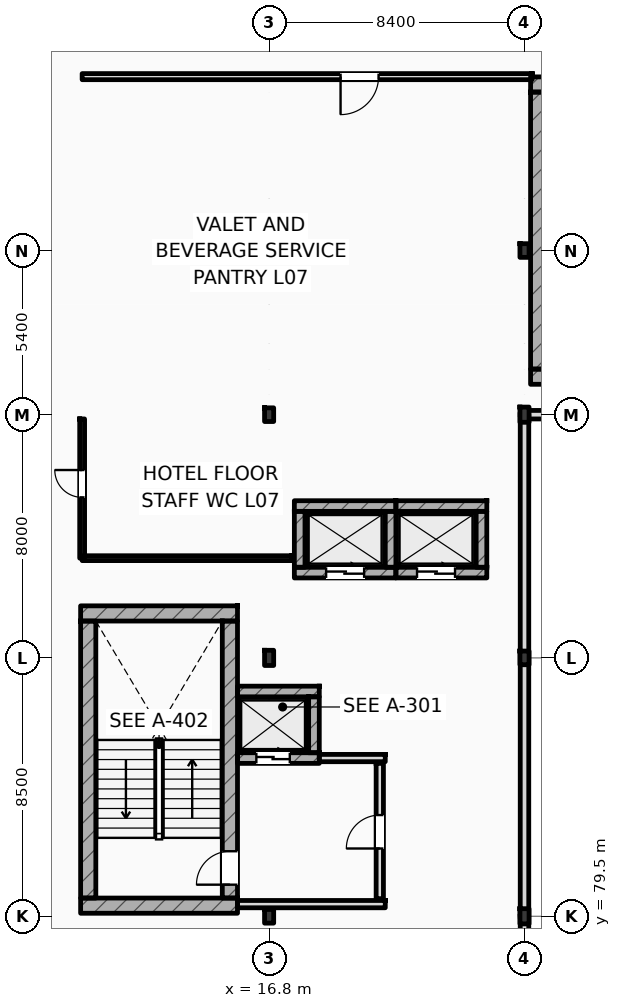
"""IFC4 building model, lengths in metres.
Left out: names, types, materials, properties, quantities, classifications, styles, units other than length and angle.
Written with IfcOpenShell. Run it as: python <this file> out.ifc"""

import sys

from ifc_helpers import new_model, si_unit, direction, frame, frame_2d, origin, origin_2d, place, context, subcontext, project, spatial, rectangle, i_section, extrude, element, fill, save


model = new_model("IFC4")
c1 = context("Model", 3, precision=1e-05, world=origin(), true_north=direction((0.0, 1.0)))
c2 = subcontext(c1, "Body", "Model", "MODEL_VIEW")
j1 = project(units=[si_unit("LENGTHUNIT", "METRE"), si_unit("PLANEANGLEUNIT", "RADIAN")], contexts=[c1])
p1 = place(None, origin())
s1 = spatial("IfcSite", under=j1, at=p1, CompositionType="ELEMENT")
p2 = place(p1, origin())
s2 = spatial("IfcBuilding", under=s1, at=p2, CompositionType="ELEMENT")
p3 = place(p2, frame((0.0, 0.0, 31.8)))
s3 = spatial("IfcBuildingStorey", under=s2, at=p3, CompositionType="ELEMENT", Elevation=31.8)
p4 = place(p3, frame((16.8, 79.5, 0.0), z_axis=(0.0, 0.0, 1.0), x_axis=(1.0, 0.0, 0.0)))
e1 = element("IfcColumn", 1, at=p4, inside=s3, PredefinedType="COLUMN", context=c2, shape_type="SweptSolid", body=[
    extrude(i_section(OverallWidth=0.3, OverallDepth=0.45, WebThickness=0.014, FlangeThickness=0.026, FilletRadius=0.027, at=origin_2d()), origin(), (0.0, 0.0, 1.0), 3.6),
])
p5 = place(p3, frame((16.8, 88.0, 0.0), z_axis=(0.0, 0.0, 1.0), x_axis=(1.0, 0.0, 0.0)))
e2 = element("IfcColumn", 2, at=p5, inside=s3, PredefinedType="COLUMN", context=c2, shape_type="SweptSolid", body=[
    extrude(i_section(OverallWidth=0.3, OverallDepth=0.5, WebThickness=0.014, FlangeThickness=0.028, FilletRadius=0.027, at=origin_2d()), origin(), (0.0, 0.0, 1.0), 3.6),
])
p6 = place(p3, frame((16.8, 96.0, 0.0), z_axis=(0.0, 0.0, 1.0), x_axis=(1.0, 0.0, 0.0)))
e3 = element("IfcColumn", 3, at=p6, inside=s3, PredefinedType="COLUMN", context=c2, shape_type="SweptSolid", body=[
    extrude(i_section(OverallWidth=0.3, OverallDepth=0.45, WebThickness=0.014, FlangeThickness=0.026, FilletRadius=0.027, at=origin_2d()), origin(), (0.0, 0.0, 1.0), 3.6),
])
p7 = place(p3, frame((25.2, 79.5, 0.0), z_axis=(0.0, 0.0, 1.0), x_axis=(1.0, 0.0, 0.0)))
e4 = element("IfcColumn", 4, at=p7, inside=s3, PredefinedType="COLUMN", context=c2, shape_type="SweptSolid", body=[
    extrude(i_section(OverallWidth=0.3, OverallDepth=0.5, WebThickness=0.014, FlangeThickness=0.028, FilletRadius=0.027, at=origin_2d()), origin(), (0.0, 0.0, 1.0), 3.6),
])
p8 = place(p3, frame((25.2, 88.0, 0.0), z_axis=(0.0, 0.0, 1.0), x_axis=(1.0, 0.0, 0.0)))
e5 = element("IfcColumn", 5, at=p8, inside=s3, PredefinedType="COLUMN", context=c2, shape_type="SweptSolid", body=[
    extrude(i_section(OverallWidth=0.3, OverallDepth=0.45, WebThickness=0.014, FlangeThickness=0.026, FilletRadius=0.027, at=origin_2d()), origin(), (0.0, 0.0, 1.0), 3.6),
])
p9 = place(p3, frame((25.2, 96.0, 0.0), z_axis=(0.0, 0.0, 1.0), x_axis=(1.0, 0.0, 0.0)))
e6 = element("IfcColumn", 6, at=p9, inside=s3, PredefinedType="COLUMN", context=c2, shape_type="SweptSolid", body=[
    extrude(i_section(OverallWidth=0.3, OverallDepth=0.5, WebThickness=0.014, FlangeThickness=0.028, FilletRadius=0.027, at=origin_2d()), origin(), (0.0, 0.0, 1.0), 3.6),
])
for number, where, z_axis, x_axis in (
    (7, (16.8, 101.4, 0.0), (0.0, 0.0, 1.0), (1.0, 0.0, 0.0)),
    (8, (25.2, 101.4, 0.0), (0.0, 0.0, 1.0), (1.0, 0.0, 0.0)),
):
    element("IfcColumn", number, at=place(p3, frame(where, z_axis=z_axis, x_axis=x_axis)), inside=s3, PredefinedType="COLUMN", context=c2, shape_type="SweptSolid", body=[
        extrude(i_section(OverallWidth=0.3, OverallDepth=0.45, WebThickness=0.014, FlangeThickness=0.026, FilletRadius=0.027, at=origin_2d()), origin(), (0.0, 0.0, 1.0), 3.6),
    ])
for number, where, z_axis, x_axis in (
    (9, (10.6, 89.462, 0.0), (0.0, 0.0, 1.0), (1.0, 0.0, 0.0)),
    (10, (10.6, 79.85, 0.0), (0.0, 0.0, 1.0), (1.0, 0.0, 0.0)),
):
    element("IfcWall", number, at=place(p3, frame(where, z_axis=z_axis, x_axis=x_axis)), inside=s3, PredefinedType="SHEAR", context=c2, shape_type="SweptSolid", body=[
        extrude(rectangle(XDim=5.16, YDim=0.5, at=frame_2d((2.58, 0.0))), origin(), (0.0, 0.0, 1.0), 3.6),
    ])
p10 = place(p3, frame((10.85, 80.1, 0.0), z_axis=(0.0, 0.0, 1.0), x_axis=(0.0, 1.0, 0.0)))
e11 = element("IfcWall", 11, at=p10, inside=s3, PredefinedType="SHEAR", context=c2, shape_type="SweptSolid", body=[
    extrude(rectangle(XDim=9.112, YDim=0.5, at=frame_2d((4.556, 0.0))), origin(), (0.0, 0.0, 1.0), 3.6),
])
p11 = place(p3, frame((15.51, 80.1, 0.0), z_axis=(0.0, 0.0, 1.0), x_axis=(0.0, 1.0, 0.0)))
e12 = element("IfcWall", 12, at=p11, inside=s3, PredefinedType="SHEAR", context=c2, shape_type="SweptSolid", body=[
    extrude(rectangle(XDim=9.112, YDim=0.5, at=frame_2d((4.556, 0.0))), origin(), (0.0, 0.0, 1.0), 3.6),
])
p12 = place(p11, frame((0.44, 0.0, 0.0)))
e13 = element("IfcOpeningElement", 13, at=p12, cuts=e12, PredefinedType="OPENING", context=c2, shape_type="SweptSolid", body=[
    extrude(rectangle(XDim=1.1, YDim=2.2, at=frame_2d((0.55, 1.1))), frame((0.0, 0.26, 0.0), z_axis=(0.0, -1.0, 0.0), x_axis=(1.0, 0.0, 0.0)), (0.0, 0.0, 1.0), 0.52),
])
for number, where, z_axis, x_axis in (
    (14, (25.4, 106.862, 0.0), (0.0, 0.0, 1.0), (1.0, 0.0, 0.0)),
    (15, (25.4, 97.25, 0.0), (0.0, 0.0, 1.0), (1.0, 0.0, 0.0)),
):
    element("IfcWall", number, at=place(p3, frame(where, z_axis=z_axis, x_axis=x_axis)), inside=s3, PredefinedType="SHEAR", context=c2, shape_type="SweptSolid", body=[
        extrude(rectangle(XDim=5.16, YDim=0.5, at=frame_2d((2.58, 0.0))), origin(), (0.0, 0.0, 1.0), 3.6),
    ])
p13 = place(p3, frame((25.65, 97.5, 0.0), z_axis=(0.0, 0.0, 1.0), x_axis=(0.0, 1.0, 0.0)))
e16 = element("IfcWall", 16, at=p13, inside=s3, PredefinedType="SHEAR", context=c2, shape_type="SweptSolid", body=[
    extrude(rectangle(XDim=9.112, YDim=0.5, at=frame_2d((4.556, 0.0))), origin(), (0.0, 0.0, 1.0), 3.6),
])
p14 = place(p3, frame((25.2, 96.0, 0.0), z_axis=(0.0, 0.0, 1.0), x_axis=(1.0, 0.0, 0.0)))
e17 = element("IfcWall", 17, at=p14, inside=s3, PredefinedType="STANDARD", context=c2, shape_type="SweptSolid", body=[
    extrude(rectangle(XDim=94.8, YDim=0.28, at=frame_2d((47.4, 0.0))), origin(), (0.0, 0.0, 1.0), 2.72),
])
p15 = place(p14, frame((16.394, 0.0, 0.9)))
e18 = element("IfcOpeningElement", 18, at=p15, cuts=e17, PredefinedType="OPENING", context=c2, shape_type="SweptSolid", body=[
    extrude(rectangle(XDim=2.0, YDim=1.64, at=frame_2d((1.0, 0.82))), frame((0.0, 0.15, 0.0), z_axis=(0.0, -1.0, 0.0), x_axis=(1.0, 0.0, 0.0)), (0.0, 0.0, 1.0), 0.3),
])
p16 = place(p14, frame((20.207, 0.0, 0.9)))
e19 = element("IfcOpeningElement", 19, at=p16, cuts=e17, PredefinedType="OPENING", context=c2, shape_type="SweptSolid", body=[
    extrude(rectangle(XDim=2.3, YDim=1.64, at=frame_2d((1.15, 0.82))), frame((0.0, 0.15, 0.0), z_axis=(0.0, -1.0, 0.0), x_axis=(1.0, 0.0, 0.0)), (0.0, 0.0, 1.0), 0.3),
])
p17 = place(p14, frame((24.287, 0.0, 0.9)))
e20 = element("IfcOpeningElement", 20, at=p17, cuts=e17, PredefinedType="OPENING", context=c2, shape_type="SweptSolid", body=[
    extrude(rectangle(XDim=2.358, YDim=1.64, at=frame_2d((1.179, 0.82))), frame((0.0, 0.15, 0.0), z_axis=(0.0, -1.0, 0.0), x_axis=(1.0, 0.0, 0.0)), (0.0, 0.0, 1.0), 0.3),
])
p18 = place(p14, frame((27.665, 0.0, 0.9)))
e21 = element("IfcOpeningElement", 21, at=p18, cuts=e17, PredefinedType="OPENING", context=c2, shape_type="SweptSolid", body=[
    extrude(rectangle(XDim=1.8, YDim=1.64, at=frame_2d((0.9, 0.82))), frame((0.0, 0.15, 0.0), z_axis=(0.0, -1.0, 0.0), x_axis=(1.0, 0.0, 0.0)), (0.0, 0.0, 1.0), 0.3),
])
p19 = place(p14, frame((32.103, 0.0, 0.9)))
e22 = element("IfcOpeningElement", 22, at=p19, cuts=e17, PredefinedType="OPENING", context=c2, shape_type="SweptSolid", body=[
    extrude(rectangle(XDim=2.359, YDim=1.64, at=frame_2d((1.179, 0.82))), frame((0.0, 0.15, 0.0), z_axis=(0.0, -1.0, 0.0), x_axis=(1.0, 0.0, 0.0)), (0.0, 0.0, 1.0), 0.3),
])
p20 = place(p14, frame((36.336, 0.0, 0.9)))
e23 = element("IfcOpeningElement", 23, at=p20, cuts=e17, PredefinedType="OPENING", context=c2, shape_type="SweptSolid", body=[
    extrude(rectangle(XDim=1.2, YDim=1.64, at=frame_2d((0.6, 0.82))), frame((0.0, 0.15, 0.0), z_axis=(0.0, -1.0, 0.0), x_axis=(1.0, 0.0, 0.0)), (0.0, 0.0, 1.0), 0.3),
])
p21 = place(p14, frame((56.177, 0.0, 0.9)))
e24 = element("IfcOpeningElement", 24, at=p21, cuts=e17, PredefinedType="OPENING", context=c2, shape_type="SweptSolid", body=[
    extrude(rectangle(XDim=1.35, YDim=1.64, at=frame_2d((0.675, 0.82))), frame((0.0, 0.15, 0.0), z_axis=(0.0, -1.0, 0.0), x_axis=(1.0, 0.0, 0.0)), (0.0, 0.0, 1.0), 0.3),
])
p22 = place(p14, frame((60.086, 0.0, 0.9)))
e25 = element("IfcOpeningElement", 25, at=p22, cuts=e17, PredefinedType="OPENING", context=c2, shape_type="SweptSolid", body=[
    extrude(rectangle(XDim=1.5, YDim=1.64, at=frame_2d((0.75, 0.82))), frame((0.0, 0.15, 0.0), z_axis=(0.0, -1.0, 0.0), x_axis=(1.0, 0.0, 0.0)), (0.0, 0.0, 1.0), 0.3),
])
p23 = place(p14, frame((64.838, 0.0, 0.9)))
e26 = element("IfcOpeningElement", 26, at=p23, cuts=e17, PredefinedType="OPENING", context=c2, shape_type="SweptSolid", body=[
    extrude(rectangle(XDim=1.65, YDim=1.64, at=frame_2d((0.825, 0.82))), frame((0.0, 0.15, 0.0), z_axis=(0.0, -1.0, 0.0), x_axis=(1.0, 0.0, 0.0)), (0.0, 0.0, 1.0), 0.3),
])
p24 = place(p14, frame((68.419, 0.0, 0.9)))
e27 = element("IfcOpeningElement", 27, at=p24, cuts=e17, PredefinedType="OPENING", context=c2, shape_type="SweptSolid", body=[
    extrude(rectangle(XDim=0.9, YDim=1.64, at=frame_2d((0.45, 0.82))), frame((0.0, 0.15, 0.0), z_axis=(0.0, -1.0, 0.0), x_axis=(1.0, 0.0, 0.0)), (0.0, 0.0, 1.0), 0.3),
])
p25 = place(p14, frame((73.544, 0.0, 0.9)))
e28 = element("IfcOpeningElement", 28, at=p25, cuts=e17, PredefinedType="OPENING", context=c2, shape_type="SweptSolid", body=[
    extrude(rectangle(XDim=1.95, YDim=1.64, at=frame_2d((0.975, 0.82))), frame((0.0, 0.15, 0.0), z_axis=(0.0, -1.0, 0.0), x_axis=(1.0, 0.0, 0.0)), (0.0, 0.0, 1.0), 0.3),
])
p26 = place(p14, frame((78.897, 0.0, 0.9)))
e29 = element("IfcOpeningElement", 29, at=p26, cuts=e17, PredefinedType="OPENING", context=c2, shape_type="SweptSolid", body=[
    extrude(rectangle(XDim=1.35, YDim=1.64, at=frame_2d((0.675, 0.82))), frame((0.0, 0.15, 0.0), z_axis=(0.0, -1.0, 0.0), x_axis=(1.0, 0.0, 0.0)), (0.0, 0.0, 1.0), 0.3),
])
p27 = place(p14, frame((82.249, 0.0, 0.9)))
e30 = element("IfcOpeningElement", 30, at=p27, cuts=e17, PredefinedType="OPENING", context=c2, shape_type="SweptSolid", body=[
    extrude(rectangle(XDim=2.25, YDim=1.64, at=frame_2d((1.125, 0.82))), frame((0.0, 0.15, 0.0), z_axis=(0.0, -1.0, 0.0), x_axis=(1.0, 0.0, 0.0)), (0.0, 0.0, 1.0), 0.3),
])
p28 = place(p14, frame((87.202, 0.0, 0.9)))
e31 = element("IfcOpeningElement", 31, at=p28, cuts=e17, PredefinedType="OPENING", context=c2, shape_type="SweptSolid", body=[
    extrude(rectangle(XDim=1.8, YDim=1.64, at=frame_2d((0.9, 0.82))), frame((0.0, 0.15, 0.0), z_axis=(0.0, -1.0, 0.0), x_axis=(1.0, 0.0, 0.0)), (0.0, 0.0, 1.0), 0.3),
])
p29 = place(p14, frame((90.867, 0.0, 0.9)))
e32 = element("IfcOpeningElement", 32, at=p29, cuts=e17, PredefinedType="OPENING", context=c2, shape_type="SweptSolid", body=[
    extrude(rectangle(XDim=2.55, YDim=1.64, at=frame_2d((1.275, 0.82))), frame((0.0, 0.15, 0.0), z_axis=(0.0, -1.0, 0.0), x_axis=(1.0, 0.0, 0.0)), (0.0, 0.0, 1.0), 0.3),
])
p30 = place(p3, frame((25.2, 62.5, 0.0), z_axis=(0.0, 0.0, 1.0), x_axis=(0.0, 1.0, 0.0)))
e33 = element("IfcWall", 33, at=p30, inside=s3, PredefinedType="STANDARD", context=c2, shape_type="SweptSolid", body=[
    extrude(rectangle(XDim=17.0, YDim=0.28, at=frame_2d((8.5, 0.0))), origin(), (0.0, 0.0, 1.0), 2.99),
])
p31 = place(p3, frame((25.2, 79.5, 0.0), z_axis=(0.0, 0.0, 1.0), x_axis=(0.0, 1.0, 0.0)))
e34 = element("IfcWall", 34, at=p31, inside=s3, PredefinedType="STANDARD", context=c2, shape_type="SweptSolid", body=[
    extrude(rectangle(XDim=16.5, YDim=0.28, at=frame_2d((8.25, 0.0))), origin(), (0.0, 0.0, 1.0), 2.99),
])
p32 = place(p3, frame((15.76, 86.895, 0.0), z_axis=(0.0, 0.0, 1.0), x_axis=(1.0, 0.0, 0.0)))
e35 = element("IfcWall", 35, at=p32, inside=s3, PredefinedType="SHEAR", context=c2, shape_type="SweptSolid", body=[
    extrude(rectangle(XDim=2.69, YDim=0.35, at=frame_2d((1.345, 0.0))), origin(), (0.0, 0.0, 1.0), 3.36),
])
p33 = place(p3, frame((15.76, 84.705, 0.0), z_axis=(0.0, 0.0, 1.0), x_axis=(1.0, 0.0, 0.0)))
e36 = element("IfcWall", 36, at=p33, inside=s3, PredefinedType="SHEAR", context=c2, shape_type="SweptSolid", body=[
    extrude(rectangle(XDim=2.69, YDim=0.35, at=frame_2d((1.345, 0.0))), origin(), (0.0, 0.0, 1.0), 3.36),
])
p34 = place(p33, frame((0.62, 0.0, 0.0)))
e37 = element("IfcOpeningElement", 37, at=p34, cuts=e36, PredefinedType="OPENING", context=c2, shape_type="SweptSolid", body=[
    extrude(rectangle(XDim=1.1, YDim=2.2, at=frame_2d((0.55, 1.1))), frame((0.0, 0.185, 0.0), z_axis=(0.0, -1.0, 0.0), x_axis=(1.0, 0.0, 0.0)), (0.0, 0.0, 1.0), 0.37),
])
p35 = place(p3, frame((18.275, 84.88, 0.0), z_axis=(0.0, 0.0, 1.0), x_axis=(0.0, 1.0, 0.0)))
e38 = element("IfcWall", 38, at=p35, inside=s3, PredefinedType="SHEAR", context=c2, shape_type="SweptSolid", body=[
    extrude(rectangle(XDim=1.84, YDim=0.35, at=frame_2d((0.92, 0.0))), origin(), (0.0, 0.0, 1.0), 3.36),
])
p36 = place(p3, frame((17.63, 92.995, 0.0), z_axis=(0.0, 0.0, 1.0), x_axis=(1.0, 0.0, 0.0)))
e39 = element("IfcWall", 39, at=p36, inside=s3, PredefinedType="SHEAR", context=c2, shape_type="SweptSolid", body=[
    extrude(rectangle(XDim=3.34, YDim=0.35, at=frame_2d((1.67, 0.0))), origin(), (0.0, 0.0, 1.0), 3.36),
])
p37 = place(p3, frame((17.63, 90.805, 0.0), z_axis=(0.0, 0.0, 1.0), x_axis=(1.0, 0.0, 0.0)))
e40 = element("IfcWall", 40, at=p37, inside=s3, PredefinedType="SHEAR", context=c2, shape_type="SweptSolid", body=[
    extrude(rectangle(XDim=3.34, YDim=0.35, at=frame_2d((1.67, 0.0))), origin(), (0.0, 0.0, 1.0), 3.36),
])
p38 = place(p37, frame((1.045, 0.0, 0.0)))
e41 = element("IfcOpeningElement", 41, at=p38, cuts=e40, PredefinedType="OPENING", context=c2, shape_type="SweptSolid", body=[
    extrude(rectangle(XDim=1.25, YDim=2.25, at=frame_2d((0.625, 1.125))), frame((0.0, 0.185, 0.0), z_axis=(0.0, -1.0, 0.0), x_axis=(1.0, 0.0, 0.0)), (0.0, 0.0, 1.0), 0.37),
])
for number, where, z_axis, x_axis in (
    (42, (17.805, 90.98, 0.0), (0.0, 0.0, 1.0), (0.0, 1.0, 0.0)),
    (43, (20.795, 90.98, 0.0), (0.0, 0.0, 1.0), (0.0, 1.0, 0.0)),
):
    element("IfcWall", number, at=place(p3, frame(where, z_axis=z_axis, x_axis=x_axis)), inside=s3, PredefinedType="SHEAR", context=c2, shape_type="SweptSolid", body=[
        extrude(rectangle(XDim=1.84, YDim=0.35, at=frame_2d((0.92, 0.0))), origin(), (0.0, 0.0, 1.0), 3.36),
    ])
p39 = place(p3, frame((20.97, 92.995, 0.0), z_axis=(0.0, 0.0, 1.0), x_axis=(1.0, 0.0, 0.0)))
e44 = element("IfcWall", 44, at=p39, inside=s3, PredefinedType="SHEAR", context=c2, shape_type="SweptSolid", body=[
    extrude(rectangle(XDim=2.99, YDim=0.35, at=frame_2d((1.495, 0.0))), origin(), (0.0, 0.0, 1.0), 3.36),
])
p40 = place(p3, frame((20.97, 90.805, 0.0), z_axis=(0.0, 0.0, 1.0), x_axis=(1.0, 0.0, 0.0)))
e45 = element("IfcWall", 45, at=p40, inside=s3, PredefinedType="SHEAR", context=c2, shape_type="SweptSolid", body=[
    extrude(rectangle(XDim=2.99, YDim=0.35, at=frame_2d((1.495, 0.0))), origin(), (0.0, 0.0, 1.0), 3.36),
])
p41 = place(p40, frame((0.695, 0.0, 0.0)))
e46 = element("IfcOpeningElement", 46, at=p41, cuts=e45, PredefinedType="OPENING", context=c2, shape_type="SweptSolid", body=[
    extrude(rectangle(XDim=1.25, YDim=2.25, at=frame_2d((0.625, 1.125))), frame((0.0, 0.185, 0.0), z_axis=(0.0, -1.0, 0.0), x_axis=(1.0, 0.0, 0.0)), (0.0, 0.0, 1.0), 0.37),
])
p42 = place(p3, frame((23.785, 90.98, 0.0), z_axis=(0.0, 0.0, 1.0), x_axis=(0.0, 1.0, 0.0)))
e47 = element("IfcWall", 47, at=p42, inside=s3, PredefinedType="SHEAR", context=c2, shape_type="SweptSolid", body=[
    extrude(rectangle(XDim=1.84, YDim=0.35, at=frame_2d((0.92, 0.0))), origin(), (0.0, 0.0, 1.0), 3.36),
])
p43 = place(p3, frame((15.76, 79.9, 0.0), z_axis=(0.0, 0.0, 1.0), x_axis=(1.0, 0.0, 0.0)))
e48 = element("IfcWall", 48, at=p43, inside=s3, PredefinedType="STANDARD", context=c2, shape_type="SweptSolid", body=[
    extrude(rectangle(XDim=4.86, YDim=0.24, at=frame_2d((2.43, 0.0))), origin(), (0.0, 0.0, 1.0), 3.36),
])
p44 = place(p3, frame((18.45, 84.705, 0.0), z_axis=(0.0, 0.0, 1.0), x_axis=(1.0, 0.0, 0.0)))
e49 = element("IfcWall", 49, at=p44, inside=s3, PredefinedType="STANDARD", context=c2, shape_type="SweptSolid", body=[
    extrude(rectangle(XDim=2.17, YDim=0.24, at=frame_2d((1.085, 0.0))), origin(), (0.0, 0.0, 1.0), 3.36),
])
p45 = place(p3, frame((20.44, 80.08, 0.0), z_axis=(0.0, 0.0, 1.0), x_axis=(0.0, 1.0, 0.0)))
e50 = element("IfcWall", 50, at=p45, inside=s3, PredefinedType="STANDARD", context=c2, shape_type="SweptSolid", body=[
    extrude(rectangle(XDim=4.45, YDim=0.24, at=frame_2d((2.225, 0.0))), origin(), (0.0, 0.0, 1.0), 3.36),
])
p46 = place(p45, frame((1.65, 0.0, 0.0)))
e51 = element("IfcOpeningElement", 51, at=p46, cuts=e50, PredefinedType="OPENING", context=c2, shape_type="SweptSolid", body=[
    extrude(rectangle(XDim=1.1, YDim=2.2, at=frame_2d((0.55, 1.1))), frame((0.0, 0.13, 0.0), z_axis=(0.0, -1.0, 0.0), x_axis=(1.0, 0.0, 0.0)), (0.0, 0.0, 1.0), 0.26),
])
p47 = place(p3, frame((10.65, 107.12, 0.0), z_axis=(0.0, 0.0, 1.0), x_axis=(1.0, 0.0, 0.0)))
e52 = element("IfcWall", 52, at=p47, inside=s3, PredefinedType="PARTITIONING", context=c2, shape_type="SweptSolid", body=[
    extrude(rectangle(XDim=14.8, YDim=0.2, at=frame_2d((7.4, 0.0))), origin(), (0.0, 0.0, 1.0), 3.36),
])
p48 = place(p47, frame((8.5, 0.0, 0.0)))
e53 = element("IfcOpeningElement", 53, at=p48, cuts=e52, PredefinedType="OPENING", context=c2, shape_type="SweptSolid", body=[
    extrude(rectangle(XDim=1.25, YDim=2.15, at=frame_2d((0.625, 1.075))), frame((0.0, 0.11, 0.0), z_axis=(0.0, -1.0, 0.0), x_axis=(1.0, 0.0, 0.0)), (0.0, 0.0, 1.0), 0.22),
])
p49 = place(p3, frame((10.65, 91.28, 0.0), z_axis=(0.0, 0.0, 1.0), x_axis=(0.0, 1.0, 0.0)))
e54 = element("IfcWall", 54, at=p49, inside=s3, PredefinedType="PARTITIONING", context=c2, shape_type="SweptSolid", body=[
    extrude(rectangle(XDim=4.58, YDim=0.16, at=frame_2d((2.29, 0.0))), origin(), (0.0, 0.0, 1.0), 3.36),
])
p50 = place(p49, frame((2.0, 0.0, 0.0)))
e55 = element("IfcOpeningElement", 55, at=p50, cuts=e54, PredefinedType="OPENING", context=c2, shape_type="SweptSolid", body=[
    extrude(rectangle(XDim=0.9, YDim=2.1, at=frame_2d((0.45, 1.05))), frame((0.0, 0.09, 0.0), z_axis=(0.0, -1.0, 0.0), x_axis=(1.0, 0.0, 0.0)), (0.0, 0.0, 1.0), 0.18),
])
p51 = place(p3, frame((10.65, 91.28, 0.0), z_axis=(0.0, 0.0, 1.0), x_axis=(1.0, 0.0, 0.0)))
e56 = element("IfcWall", 56, at=p51, inside=s3, PredefinedType="PARTITIONING", context=c2, shape_type="SweptSolid", body=[
    extrude(rectangle(XDim=6.9, YDim=0.16, at=frame_2d((3.45, 0.0))), origin(), (0.0, 0.0, 1.0), 3.36),
])
p52 = place(p12, origin())
e57 = element("IfcDoor", 57, at=p52, inside=s3, OperationType="SINGLE_SWING_LEFT", PredefinedType="DOOR", context=c2, shape_type="SweptSolid", body=[
    extrude(rectangle(XDim=1.1, YDim=2.2, at=frame_2d((0.55, 1.1))), frame((0.0, 0.025, 0.0), z_axis=(0.0, -1.0, 0.0), x_axis=(1.0, 0.0, 0.0)), (0.0, 0.0, 1.0), 0.05),
])
fill(e13, e57)
p53 = place(p34, origin())
e58 = element("IfcDoor", 58, at=p53, inside=s3, OperationType="SLIDING_TO_LEFT", PredefinedType="DOOR", context=c2, shape_type="SweptSolid", body=[
    extrude(rectangle(XDim=1.1, YDim=2.2, at=frame_2d((0.55, 1.1))), frame((0.0, 0.025, 0.0), z_axis=(0.0, -1.0, 0.0), x_axis=(1.0, 0.0, 0.0)), (0.0, 0.0, 1.0), 0.05),
])
fill(e37, e58)
p54 = place(p38, origin())
e59 = element("IfcDoor", 59, at=p54, inside=s3, OperationType="SLIDING_TO_LEFT", PredefinedType="DOOR", context=c2, shape_type="SweptSolid", body=[
    extrude(rectangle(XDim=1.25, YDim=2.25, at=frame_2d((0.625, 1.125))), frame((0.0, 0.025, 0.0), z_axis=(0.0, -1.0, 0.0), x_axis=(1.0, 0.0, 0.0)), (0.0, 0.0, 1.0), 0.05),
])
fill(e41, e59)
p55 = place(p41, origin())
e60 = element("IfcDoor", 60, at=p55, inside=s3, OperationType="SLIDING_TO_LEFT", PredefinedType="DOOR", context=c2, shape_type="SweptSolid", body=[
    extrude(rectangle(XDim=1.25, YDim=2.25, at=frame_2d((0.625, 1.125))), frame((0.0, 0.025, 0.0), z_axis=(0.0, -1.0, 0.0), x_axis=(1.0, 0.0, 0.0)), (0.0, 0.0, 1.0), 0.05),
])
fill(e46, e60)
p56 = place(p46, origin())
e61 = element("IfcDoor", 61, at=p56, inside=s3, OperationType="SINGLE_SWING_LEFT", PredefinedType="DOOR", context=c2, shape_type="SweptSolid", body=[
    extrude(rectangle(XDim=1.1, YDim=2.2, at=frame_2d((0.55, 1.1))), frame((0.0, 0.025, 0.0), z_axis=(0.0, -1.0, 0.0), x_axis=(1.0, 0.0, 0.0)), (0.0, 0.0, 1.0), 0.05),
])
fill(e51, e61)
p57 = place(p50, origin())
e62 = element("IfcDoor", 62, at=p57, inside=s3, OperationType="SINGLE_SWING_RIGHT", PredefinedType="DOOR", context=c2, shape_type="SweptSolid", body=[
    extrude(rectangle(XDim=0.9, YDim=2.1, at=frame_2d((0.45, 1.05))), frame((0.0, 0.025, 0.0), z_axis=(0.0, -1.0, 0.0), x_axis=(1.0, 0.0, 0.0)), (0.0, 0.0, 1.0), 0.05),
])
fill(e55, e62)
p58 = place(p48, frame((1.25, 0.0, 0.0), z_axis=(0.0, 0.0, 1.0), x_axis=(-1.0, 0.0, 0.0)))
e63 = element("IfcDoor", 63, at=p58, inside=s3, OperationType="SINGLE_SWING_LEFT", PredefinedType="DOOR", context=c2, shape_type="SweptSolid", body=[
    extrude(rectangle(XDim=1.25, YDim=2.15, at=frame_2d((0.625, 1.075))), frame((0.0, 0.025, 0.0), z_axis=(0.0, -1.0, 0.0), x_axis=(1.0, 0.0, 0.0)), (0.0, 0.0, 1.0), 0.05),
])
fill(e53, e63)
save(model, sys.argv[1])
